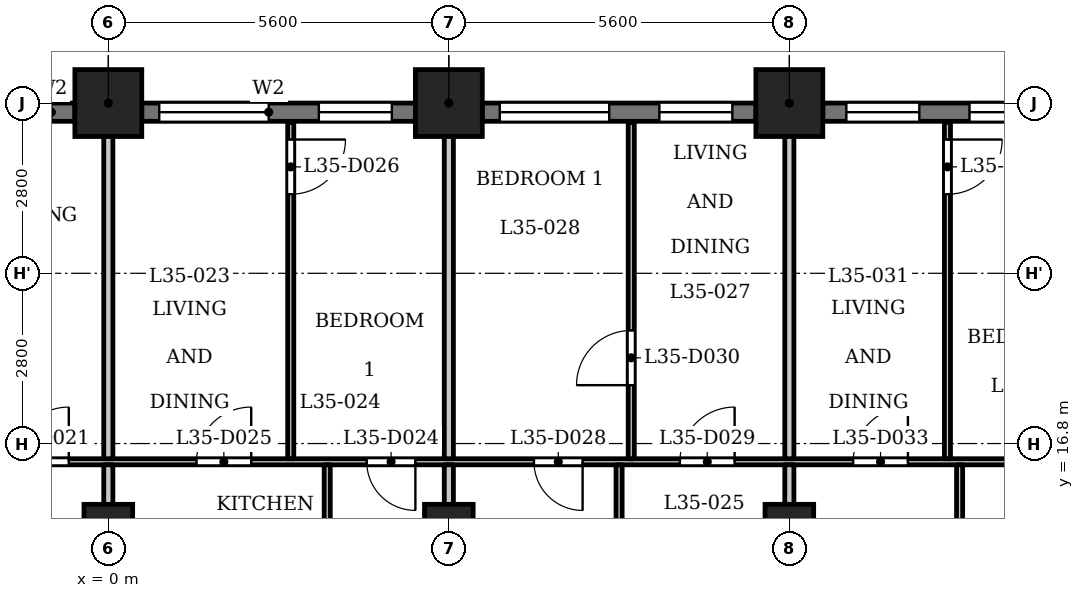
"""IFC4 building model, lengths in metres.
Left out: names, types, materials, properties, quantities, classifications, styles, units other than length and angle.
Written with IfcOpenShell. Run it as: python <this file> out.ifc"""

import sys

from ifc_helpers import new_model, si_unit, direction, frame, frame_2d, origin, origin_2d, place, context, subcontext, project, spatial, rectangle, extrude, element, fill, save


model = new_model("IFC4")
c1 = context("Model", 3, precision=1e-05, world=origin(), true_north=direction((0.0, 1.0)))
c2 = subcontext(c1, "Body", "Model", "MODEL_VIEW")
j1 = project(units=[si_unit("LENGTHUNIT", "METRE"), si_unit("PLANEANGLEUNIT", "RADIAN")], contexts=[c1])
p1 = place(None, origin())
s1 = spatial("IfcSite", under=j1, at=p1, CompositionType="ELEMENT")
p2 = place(p1, origin())
s2 = spatial("IfcBuilding", under=s1, at=p2, CompositionType="ELEMENT")
p3 = place(p2, frame((0.0, 0.0, 139.6)))
s3 = spatial("IfcBuildingStorey", under=s2, at=p3, CompositionType="ELEMENT", Elevation=139.6)
for number, where, z_axis, x_axis in (
    (1, (11.2, 22.4, 0.0), (0.0, 0.0, 1.0), (1.0, 0.0, 0.0)),
    (2, (5.6, 22.4, 0.0), (0.0, 0.0, 1.0), (1.0, 0.0, 0.0)),
    (3, (0.0, 22.4, 0.0), (0.0, 0.0, 1.0), (1.0, 0.0, 0.0)),
):
    element("IfcColumn", number, at=place(p3, frame(where, z_axis=z_axis, x_axis=x_axis)), inside=s3, PredefinedType="COLUMN", context=c2, shape_type="SweptSolid", body=[
        extrude(rectangle(XDim=1.1, YDim=1.1, at=origin_2d()), origin(), (0.0, 0.0, 1.0), 3.5),
    ])
for number, where, z_axis, x_axis in (
    (4, (0.0, 15.4, 0.0), (0.0, 0.0, 1.0), (1.0, 0.0, 0.0)),
    (5, (5.6, 15.4, 0.0), (0.0, 0.0, 1.0), (1.0, 0.0, 0.0)),
    (6, (11.2, 15.4, 0.0), (0.0, 0.0, 1.0), (1.0, 0.0, 0.0)),
):
    element("IfcColumn", number, at=place(p3, frame(where, z_axis=z_axis, x_axis=x_axis)), inside=s3, PredefinedType="COLUMN", context=c2, shape_type="SweptSolid", body=[
        extrude(rectangle(XDim=0.8, YDim=0.8, at=origin_2d()), origin(), (0.0, 0.0, 1.0), 3.5),
    ])
p4 = place(p3, frame((16.25, 22.25, 0.0), z_axis=(0.0, 0.0, 1.0), x_axis=(-1.0, 0.0, 0.0)))
e7 = element("IfcWall", 7, at=p4, inside=s3, PredefinedType="SOLIDWALL", context=c2, shape_type="SweptSolid", body=[
    extrude(rectangle(XDim=4.5, YDim=0.3, at=frame_2d((2.25, 0.0))), origin(), (0.0, 0.0, 1.0), 2.45),
])
p5 = place(p4, frame((0.288, 0.0, 0.9)))
e8 = element("IfcOpeningElement", 8, at=p5, cuts=e7, PredefinedType="OPENING", context=c2, shape_type="SweptSolid", body=[
    extrude(rectangle(XDim=1.8, YDim=1.25, at=frame_2d((0.9, 0.625))), frame((0.0, 0.16, 0.0), z_axis=(0.0, -1.0, 0.0), x_axis=(1.0, 0.0, 0.0)), (0.0, 0.0, 1.0), 0.32),
])
p6 = place(p4, frame((2.913, 0.0, 0.6)))
e9 = element("IfcOpeningElement", 9, at=p6, cuts=e7, PredefinedType="OPENING", context=c2, shape_type="SweptSolid", body=[
    extrude(rectangle(XDim=1.2, YDim=1.55, at=frame_2d((0.6, 0.775))), frame((0.0, 0.16, 0.0), z_axis=(0.0, -1.0, 0.0), x_axis=(1.0, 0.0, 0.0)), (0.0, 0.0, 1.0), 0.32),
])
p7 = place(p3, frame((10.65, 22.25, 0.0), z_axis=(0.0, 0.0, 1.0), x_axis=(-1.0, 0.0, 0.0)))
e10 = element("IfcWall", 10, at=p7, inside=s3, PredefinedType="SOLIDWALL", context=c2, shape_type="SweptSolid", body=[
    extrude(rectangle(XDim=4.5, YDim=0.3, at=frame_2d((2.25, 0.0))), origin(), (0.0, 0.0, 1.0), 2.45),
])
p8 = place(p7, frame((0.387, 0.0, 0.6)))
e11 = element("IfcOpeningElement", 11, at=p8, cuts=e10, PredefinedType="OPENING", context=c2, shape_type="SweptSolid", body=[
    extrude(rectangle(XDim=1.2, YDim=1.55, at=frame_2d((0.6, 0.775))), frame((0.0, 0.16, 0.0), z_axis=(0.0, -1.0, 0.0), x_axis=(1.0, 0.0, 0.0)), (0.0, 0.0, 1.0), 0.32),
])
p9 = place(p7, frame((2.413, 0.0, 0.9)))
e12 = element("IfcOpeningElement", 12, at=p9, cuts=e10, PredefinedType="OPENING", context=c2, shape_type="SweptSolid", body=[
    extrude(rectangle(XDim=1.8, YDim=1.25, at=frame_2d((0.9, 0.625))), frame((0.0, 0.16, 0.0), z_axis=(0.0, -1.0, 0.0), x_axis=(1.0, 0.0, 0.0)), (0.0, 0.0, 1.0), 0.32),
])
p10 = place(p3, frame((5.05, 22.25, 0.0), z_axis=(0.0, 0.0, 1.0), x_axis=(-1.0, 0.0, 0.0)))
e13 = element("IfcWall", 13, at=p10, inside=s3, PredefinedType="SOLIDWALL", context=c2, shape_type="SweptSolid", body=[
    extrude(rectangle(XDim=4.5, YDim=0.3, at=frame_2d((2.25, 0.0))), origin(), (0.0, 0.0, 1.0), 2.45),
])
p11 = place(p10, frame((0.387, 0.0, 0.6)))
e14 = element("IfcOpeningElement", 14, at=p11, cuts=e13, PredefinedType="OPENING", context=c2, shape_type="SweptSolid", body=[
    extrude(rectangle(XDim=1.2, YDim=1.55, at=frame_2d((0.6, 0.775))), frame((0.0, 0.16, 0.0), z_axis=(0.0, -1.0, 0.0), x_axis=(1.0, 0.0, 0.0)), (0.0, 0.0, 1.0), 0.32),
])
p12 = place(p10, frame((2.413, 0.0, 0.9)))
e15 = element("IfcOpeningElement", 15, at=p12, cuts=e13, PredefinedType="OPENING", context=c2, shape_type="SweptSolid", body=[
    extrude(rectangle(XDim=1.8, YDim=1.25, at=frame_2d((0.9, 0.625))), frame((0.0, 0.16, 0.0), z_axis=(0.0, -1.0, 0.0), x_axis=(1.0, 0.0, 0.0)), (0.0, 0.0, 1.0), 0.32),
])
p13 = place(p3, frame((-0.55, 22.25, 0.0), z_axis=(0.0, 0.0, 1.0), x_axis=(-1.0, 0.0, 0.0)))
e16 = element("IfcWall", 16, at=p13, inside=s3, PredefinedType="SOLIDWALL", context=c2, shape_type="SweptSolid", body=[
    extrude(rectangle(XDim=4.5, YDim=0.3, at=frame_2d((2.25, 0.0))), origin(), (0.0, 0.0, 1.0), 2.45),
])
p14 = place(p13, frame((0.387, 0.0, 0.9)))
e17 = element("IfcOpeningElement", 17, at=p14, cuts=e16, PredefinedType="OPENING", context=c2, shape_type="SweptSolid", body=[
    extrude(rectangle(XDim=1.8, YDim=1.25, at=frame_2d((0.9, 0.625))), frame((0.0, 0.16, 0.0), z_axis=(0.0, -1.0, 0.0), x_axis=(1.0, 0.0, 0.0)), (0.0, 0.0, 1.0), 0.32),
])
p15 = place(p13, frame((3.012, 0.0, 0.6)))
e18 = element("IfcOpeningElement", 18, at=p15, cuts=e16, PredefinedType="OPENING", context=c2, shape_type="SweptSolid", body=[
    extrude(rectangle(XDim=1.2, YDim=1.55, at=frame_2d((0.6, 0.775))), frame((0.0, 0.16, 0.0), z_axis=(0.0, -1.0, 0.0), x_axis=(1.0, 0.0, 0.0)), (0.0, 0.0, 1.0), 0.32),
])
p16 = place(p3, frame((-16.725, 16.5, 0.0), z_axis=(0.0, 0.0, 1.0), x_axis=(1.0, 0.0, 0.0)))
e19 = element("IfcWall", 19, at=p16, inside=s3, PredefinedType="PARTITIONING", context=c2, shape_type="SweptSolid", body=[
    extrude(rectangle(XDim=33.45, YDim=0.1, at=frame_2d((16.725, 0.0))), origin(), (0.0, 0.0, 1.0), 3.2),
])
p17 = place(p16, frame((9.675, 0.0, 0.0)))
e20 = element("IfcOpeningElement", 20, at=p17, cuts=e19, PredefinedType="OPENING", context=c2, shape_type="SweptSolid", body=[
    extrude(rectangle(XDim=0.8, YDim=2.1, at=frame_2d((0.4, 1.05))), frame((0.0, 0.06, 0.0), z_axis=(0.0, -1.0, 0.0), x_axis=(1.0, 0.0, 0.0)), (0.0, 0.0, 1.0), 0.12),
])
p18 = place(p16, frame((3.975, 0.0, 0.0)))
e21 = element("IfcOpeningElement", 21, at=p18, cuts=e19, PredefinedType="OPENING", context=c2, shape_type="SweptSolid", body=[
    extrude(rectangle(XDim=0.9, YDim=2.1, at=frame_2d((0.45, 1.05))), frame((0.0, 0.06, 0.0), z_axis=(0.0, -1.0, 0.0), x_axis=(1.0, 0.0, 0.0)), (0.0, 0.0, 1.0), 0.12),
])
p19 = place(p16, frame((12.025, 0.0, 0.0)))
e22 = element("IfcOpeningElement", 22, at=p19, cuts=e19, PredefinedType="OPENING", context=c2, shape_type="SweptSolid", body=[
    extrude(rectangle(XDim=0.8, YDim=2.1, at=frame_2d((0.4, 1.05))), frame((0.0, 0.06, 0.0), z_axis=(0.0, -1.0, 0.0), x_axis=(1.0, 0.0, 0.0)), (0.0, 0.0, 1.0), 0.12),
])
p20 = place(p16, frame((15.175, 0.0, 0.0)))
e23 = element("IfcOpeningElement", 23, at=p20, cuts=e19, PredefinedType="OPENING", context=c2, shape_type="SweptSolid", body=[
    extrude(rectangle(XDim=0.9, YDim=2.1, at=frame_2d((0.45, 1.05))), frame((0.0, 0.06, 0.0), z_axis=(0.0, -1.0, 0.0), x_axis=(1.0, 0.0, 0.0)), (0.0, 0.0, 1.0), 0.12),
])
p21 = place(p16, frame((20.975, 0.0, 0.0)))
e24 = element("IfcOpeningElement", 24, at=p21, cuts=e19, PredefinedType="OPENING", context=c2, shape_type="SweptSolid", body=[
    extrude(rectangle(XDim=0.8, YDim=2.1, at=frame_2d((0.4, 1.05))), frame((0.0, 0.06, 0.0), z_axis=(0.0, -1.0, 0.0), x_axis=(1.0, 0.0, 0.0)), (0.0, 0.0, 1.0), 0.12),
])
p22 = place(p16, frame((18.175, 0.0, 0.0)))
e25 = element("IfcOpeningElement", 25, at=p22, cuts=e19, PredefinedType="OPENING", context=c2, shape_type="SweptSolid", body=[
    extrude(rectangle(XDim=0.9, YDim=2.1, at=frame_2d((0.45, 1.05))), frame((0.0, 0.06, 0.0), z_axis=(0.0, -1.0, 0.0), x_axis=(1.0, 0.0, 0.0)), (0.0, 0.0, 1.0), 0.12),
])
p23 = place(p16, frame((23.725, 0.0, 0.0)))
e26 = element("IfcOpeningElement", 26, at=p23, cuts=e19, PredefinedType="OPENING", context=c2, shape_type="SweptSolid", body=[
    extrude(rectangle(XDim=0.8, YDim=2.1, at=frame_2d((0.4, 1.05))), frame((0.0, 0.06, 0.0), z_axis=(0.0, -1.0, 0.0), x_axis=(1.0, 0.0, 0.0)), (0.0, 0.0, 1.0), 0.12),
])
p24 = place(p16, frame((26.125, 0.0, 0.0)))
e27 = element("IfcOpeningElement", 27, at=p24, cuts=e19, PredefinedType="OPENING", context=c2, shape_type="SweptSolid", body=[
    extrude(rectangle(XDim=0.9, YDim=2.1, at=frame_2d((0.45, 1.05))), frame((0.0, 0.06, 0.0), z_axis=(0.0, -1.0, 0.0), x_axis=(1.0, 0.0, 0.0)), (0.0, 0.0, 1.0), 0.12),
])
p25 = place(p16, frame((32.125, 0.0, 0.0)))
e28 = element("IfcOpeningElement", 28, at=p25, cuts=e19, PredefinedType="OPENING", context=c2, shape_type="SweptSolid", body=[
    extrude(rectangle(XDim=0.8, YDim=2.1, at=frame_2d((0.4, 1.05))), frame((0.0, 0.06, 0.0), z_axis=(0.0, -1.0, 0.0), x_axis=(1.0, 0.0, 0.0)), (0.0, 0.0, 1.0), 0.12),
])
p26 = place(p16, frame((28.975, 0.0, 0.0)))
e29 = element("IfcOpeningElement", 29, at=p26, cuts=e19, PredefinedType="OPENING", context=c2, shape_type="SweptSolid", body=[
    extrude(rectangle(XDim=0.9, YDim=2.1, at=frame_2d((0.45, 1.05))), frame((0.0, 0.06, 0.0), z_axis=(0.0, -1.0, 0.0), x_axis=(1.0, 0.0, 0.0)), (0.0, 0.0, 1.0), 0.12),
])
p27 = place(p3, frame((0.0, 13.275, 0.0), z_axis=(0.0, 0.0, 1.0), x_axis=(0.0, 1.0, 0.0)))
e30 = element("IfcWall", 30, at=p27, inside=s3, PredefinedType="PARTITIONING", context=c2, shape_type="SweptSolid", body=[
    extrude(rectangle(XDim=3.175, YDim=0.15, at=frame_2d((1.587, 0.0))), origin(), (0.0, 0.0, 1.0), 3.2),
])
p28 = place(p3, frame((0.0, 16.55, 0.0), z_axis=(0.0, 0.0, 1.0), x_axis=(0.0, 1.0, 0.0)))
e31 = element("IfcWall", 31, at=p28, inside=s3, PredefinedType="PARTITIONING", context=c2, shape_type="SweptSolid", body=[
    extrude(rectangle(XDim=6.38, YDim=0.15, at=frame_2d((3.19, 0.0))), origin(), (0.0, 0.0, 1.0), 3.2),
])
p29 = place(p3, frame((3.0, 16.55, 0.0), z_axis=(0.0, 0.0, 1.0), x_axis=(0.0, 1.0, 0.0)))
e32 = element("IfcWall", 32, at=p29, inside=s3, PredefinedType="PARTITIONING", context=c2, shape_type="SweptSolid", body=[
    extrude(rectangle(XDim=5.53, YDim=0.1, at=frame_2d((2.765, 0.0))), origin(), (0.0, 0.0, 1.0), 3.2),
])
p30 = place(p29, frame((4.35, 0.0, 0.0)))
e33 = element("IfcOpeningElement", 33, at=p30, cuts=e32, PredefinedType="OPENING", context=c2, shape_type="SweptSolid", body=[
    extrude(rectangle(XDim=0.9, YDim=2.1, at=frame_2d((0.45, 1.05))), frame((0.0, 0.06, 0.0), z_axis=(0.0, -1.0, 0.0), x_axis=(1.0, 0.0, 0.0)), (0.0, 0.0, 1.0), 0.12),
])
p31 = place(p3, frame((3.6, 13.275, 0.0), z_axis=(0.0, 0.0, 1.0), x_axis=(0.0, 1.0, 0.0)))
e34 = element("IfcWall", 34, at=p31, inside=s3, PredefinedType="PARTITIONING", context=c2, shape_type="SweptSolid", body=[
    extrude(rectangle(XDim=3.175, YDim=0.1, at=frame_2d((1.587, 0.0))), origin(), (0.0, 0.0, 1.0), 3.2),
])
p32 = place(p3, frame((5.6, 13.275, 0.0), z_axis=(0.0, 0.0, 1.0), x_axis=(0.0, 1.0, 0.0)))
e35 = element("IfcWall", 35, at=p32, inside=s3, PredefinedType="PARTITIONING", context=c2, shape_type="SweptSolid", body=[
    extrude(rectangle(XDim=3.175, YDim=0.15, at=frame_2d((1.587, 0.0))), origin(), (0.0, 0.0, 1.0), 3.2),
])
p33 = place(p3, frame((5.6, 16.55, 0.0), z_axis=(0.0, 0.0, 1.0), x_axis=(0.0, 1.0, 0.0)))
e36 = element("IfcWall", 36, at=p33, inside=s3, PredefinedType="PARTITIONING", context=c2, shape_type="SweptSolid", body=[
    extrude(rectangle(XDim=6.38, YDim=0.15, at=frame_2d((3.19, 0.0))), origin(), (0.0, 0.0, 1.0), 3.2),
])
p34 = place(p3, frame((8.4, 13.275, 0.0), z_axis=(0.0, 0.0, 1.0), x_axis=(0.0, 1.0, 0.0)))
e37 = element("IfcWall", 37, at=p34, inside=s3, PredefinedType="PARTITIONING", context=c2, shape_type="SweptSolid", body=[
    extrude(rectangle(XDim=3.175, YDim=0.1, at=frame_2d((1.587, 0.0))), origin(), (0.0, 0.0, 1.0), 3.2),
])
p35 = place(p3, frame((8.6, 16.55, 0.0), z_axis=(0.0, 0.0, 1.0), x_axis=(0.0, 1.0, 0.0)))
e38 = element("IfcWall", 38, at=p35, inside=s3, PredefinedType="PARTITIONING", context=c2, shape_type="SweptSolid", body=[
    extrude(rectangle(XDim=5.53, YDim=0.1, at=frame_2d((2.765, 0.0))), origin(), (0.0, 0.0, 1.0), 3.2),
])
p36 = place(p35, frame((1.21, 0.0, 0.0)))
e39 = element("IfcOpeningElement", 39, at=p36, cuts=e38, PredefinedType="OPENING", context=c2, shape_type="SweptSolid", body=[
    extrude(rectangle(XDim=0.9, YDim=2.1, at=frame_2d((0.45, 1.05))), frame((0.0, 0.06, 0.0), z_axis=(0.0, -1.0, 0.0), x_axis=(1.0, 0.0, 0.0)), (0.0, 0.0, 1.0), 0.12),
])
p37 = place(p3, frame((11.2, 13.275, 0.0), z_axis=(0.0, 0.0, 1.0), x_axis=(0.0, 1.0, 0.0)))
e40 = element("IfcWall", 40, at=p37, inside=s3, PredefinedType="PARTITIONING", context=c2, shape_type="SweptSolid", body=[
    extrude(rectangle(XDim=3.175, YDim=0.15, at=frame_2d((1.587, 0.0))), origin(), (0.0, 0.0, 1.0), 3.2),
])
p38 = place(p3, frame((11.2, 16.55, 0.0), z_axis=(0.0, 0.0, 1.0), x_axis=(0.0, 1.0, 0.0)))
e41 = element("IfcWall", 41, at=p38, inside=s3, PredefinedType="PARTITIONING", context=c2, shape_type="SweptSolid", body=[
    extrude(rectangle(XDim=6.38, YDim=0.15, at=frame_2d((3.19, 0.0))), origin(), (0.0, 0.0, 1.0), 3.2),
])
p39 = place(p3, frame((13.8, 16.55, 0.0), z_axis=(0.0, 0.0, 1.0), x_axis=(0.0, 1.0, 0.0)))
e42 = element("IfcWall", 42, at=p39, inside=s3, PredefinedType="PARTITIONING", context=c2, shape_type="SweptSolid", body=[
    extrude(rectangle(XDim=5.53, YDim=0.1, at=frame_2d((2.765, 0.0))), origin(), (0.0, 0.0, 1.0), 3.2),
])
p40 = place(p39, frame((4.35, 0.0, 0.0)))
e43 = element("IfcOpeningElement", 43, at=p40, cuts=e42, PredefinedType="OPENING", context=c2, shape_type="SweptSolid", body=[
    extrude(rectangle(XDim=0.9, YDim=2.1, at=frame_2d((0.45, 1.05))), frame((0.0, 0.06, 0.0), z_axis=(0.0, -1.0, 0.0), x_axis=(1.0, 0.0, 0.0)), (0.0, 0.0, 1.0), 0.12),
])
p41 = place(p3, frame((14.0, 13.275, 0.0), z_axis=(0.0, 0.0, 1.0), x_axis=(0.0, 1.0, 0.0)))
e44 = element("IfcWall", 44, at=p41, inside=s3, PredefinedType="PARTITIONING", context=c2, shape_type="SweptSolid", body=[
    extrude(rectangle(XDim=3.175, YDim=0.1, at=frame_2d((1.587, 0.0))), origin(), (0.0, 0.0, 1.0), 3.2),
])
p42 = place(p20, origin())
e45 = element("IfcDoor", 45, at=p42, inside=s3, OperationType="SINGLE_SWING_LEFT", PredefinedType="DOOR", context=c2, shape_type="SweptSolid", body=[
    extrude(rectangle(XDim=0.9, YDim=2.1, at=frame_2d((0.45, 1.05))), frame((0.0, 0.025, 0.0), z_axis=(0.0, -1.0, 0.0), x_axis=(1.0, 0.0, 0.0)), (0.0, 0.0, 1.0), 0.05),
])
fill(e23, e45)
p43 = place(p21, origin())
e46 = element("IfcDoor", 46, at=p43, inside=s3, OperationType="SINGLE_SWING_RIGHT", PredefinedType="DOOR", context=c2, shape_type="SweptSolid", body=[
    extrude(rectangle(XDim=0.8, YDim=2.1, at=frame_2d((0.4, 1.05))), frame((0.0, 0.025, 0.0), z_axis=(0.0, -1.0, 0.0), x_axis=(1.0, 0.0, 0.0)), (0.0, 0.0, 1.0), 0.05),
])
fill(e24, e46)
p44 = place(p22, origin())
e47 = element("IfcDoor", 47, at=p44, inside=s3, OperationType="SINGLE_SWING_LEFT", PredefinedType="DOOR", context=c2, shape_type="SweptSolid", body=[
    extrude(rectangle(XDim=0.9, YDim=2.1, at=frame_2d((0.45, 1.05))), frame((0.0, 0.025, 0.0), z_axis=(0.0, -1.0, 0.0), x_axis=(1.0, 0.0, 0.0)), (0.0, 0.0, 1.0), 0.05),
])
fill(e25, e47)
p45 = place(p30, origin())
e48 = element("IfcDoor", 48, at=p45, inside=s3, OperationType="SINGLE_SWING_RIGHT", PredefinedType="DOOR", context=c2, shape_type="SweptSolid", body=[
    extrude(rectangle(XDim=0.9, YDim=2.1, at=frame_2d((0.45, 1.05))), frame((0.0, 0.025, 0.0), z_axis=(0.0, -1.0, 0.0), x_axis=(1.0, 0.0, 0.0)), (0.0, 0.0, 1.0), 0.05),
])
fill(e33, e48)
p46 = place(p23, origin())
e49 = element("IfcDoor", 49, at=p46, inside=s3, OperationType="SINGLE_SWING_RIGHT", PredefinedType="DOOR", context=c2, shape_type="SweptSolid", body=[
    extrude(rectangle(XDim=0.8, YDim=2.1, at=frame_2d((0.4, 1.05))), frame((0.0, 0.025, 0.0), z_axis=(0.0, -1.0, 0.0), x_axis=(1.0, 0.0, 0.0)), (0.0, 0.0, 1.0), 0.05),
])
fill(e26, e49)
p47 = place(p24, origin())
e50 = element("IfcDoor", 50, at=p47, inside=s3, OperationType="SINGLE_SWING_LEFT", PredefinedType="DOOR", context=c2, shape_type="SweptSolid", body=[
    extrude(rectangle(XDim=0.9, YDim=2.1, at=frame_2d((0.45, 1.05))), frame((0.0, 0.025, 0.0), z_axis=(0.0, -1.0, 0.0), x_axis=(1.0, 0.0, 0.0)), (0.0, 0.0, 1.0), 0.05),
])
fill(e27, e50)
p48 = place(p36, origin())
e51 = element("IfcDoor", 51, at=p48, inside=s3, OperationType="SINGLE_SWING_RIGHT", PredefinedType="DOOR", context=c2, shape_type="SweptSolid", body=[
    extrude(rectangle(XDim=0.9, YDim=2.1, at=frame_2d((0.45, 1.05))), frame((0.0, 0.025, 0.0), z_axis=(0.0, -1.0, 0.0), x_axis=(1.0, 0.0, 0.0)), (0.0, 0.0, 1.0), 0.05),
])
fill(e39, e51)
p49 = place(p26, origin())
e52 = element("IfcDoor", 52, at=p49, inside=s3, OperationType="SINGLE_SWING_LEFT", PredefinedType="DOOR", context=c2, shape_type="SweptSolid", body=[
    extrude(rectangle(XDim=0.9, YDim=2.1, at=frame_2d((0.45, 1.05))), frame((0.0, 0.025, 0.0), z_axis=(0.0, -1.0, 0.0), x_axis=(1.0, 0.0, 0.0)), (0.0, 0.0, 1.0), 0.05),
])
fill(e29, e52)
p50 = place(p40, origin())
e53 = element("IfcDoor", 53, at=p50, inside=s3, OperationType="SINGLE_SWING_RIGHT", PredefinedType="DOOR", context=c2, shape_type="SweptSolid", body=[
    extrude(rectangle(XDim=0.9, YDim=2.1, at=frame_2d((0.45, 1.05))), frame((0.0, 0.025, 0.0), z_axis=(0.0, -1.0, 0.0), x_axis=(1.0, 0.0, 0.0)), (0.0, 0.0, 1.0), 0.05),
])
fill(e43, e53)
p51 = place(p5, origin())
e54 = element("IfcWindow", 54, at=p51, inside=s3, PartitioningType="SINGLE_PANEL", PredefinedType="WINDOW", context=c2, shape_type="SweptSolid", body=[
    extrude(rectangle(XDim=1.8, YDim=1.25, at=frame_2d((0.9, 0.625))), frame((0.0, 0.03, 0.0), z_axis=(0.0, -1.0, 0.0), x_axis=(1.0, 0.0, 0.0)), (0.0, 0.0, 1.0), 0.06),
])
fill(e8, e54)
p52 = place(p6, origin())
e55 = element("IfcWindow", 55, at=p52, inside=s3, PartitioningType="SINGLE_PANEL", PredefinedType="WINDOW", context=c2, shape_type="SweptSolid", body=[
    extrude(rectangle(XDim=1.2, YDim=1.55, at=frame_2d((0.6, 0.775))), frame((0.0, 0.03, 0.0), z_axis=(0.0, -1.0, 0.0), x_axis=(1.0, 0.0, 0.0)), (0.0, 0.0, 1.0), 0.06),
])
fill(e9, e55)
p53 = place(p8, origin())
e56 = element("IfcWindow", 56, at=p53, inside=s3, PartitioningType="SINGLE_PANEL", PredefinedType="WINDOW", context=c2, shape_type="SweptSolid", body=[
    extrude(rectangle(XDim=1.2, YDim=1.55, at=frame_2d((0.6, 0.775))), frame((0.0, 0.03, 0.0), z_axis=(0.0, -1.0, 0.0), x_axis=(1.0, 0.0, 0.0)), (0.0, 0.0, 1.0), 0.06),
])
fill(e11, e56)
p54 = place(p9, origin())
e57 = element("IfcWindow", 57, at=p54, inside=s3, PartitioningType="SINGLE_PANEL", PredefinedType="WINDOW", context=c2, shape_type="SweptSolid", body=[
    extrude(rectangle(XDim=1.8, YDim=1.25, at=frame_2d((0.9, 0.625))), frame((0.0, 0.03, 0.0), z_axis=(0.0, -1.0, 0.0), x_axis=(1.0, 0.0, 0.0)), (0.0, 0.0, 1.0), 0.06),
])
fill(e12, e57)
p55 = place(p11, origin())
e58 = element("IfcWindow", 58, at=p55, inside=s3, PartitioningType="SINGLE_PANEL", PredefinedType="WINDOW", context=c2, shape_type="SweptSolid", body=[
    extrude(rectangle(XDim=1.2, YDim=1.55, at=frame_2d((0.6, 0.775))), frame((0.0, 0.03, 0.0), z_axis=(0.0, -1.0, 0.0), x_axis=(1.0, 0.0, 0.0)), (0.0, 0.0, 1.0), 0.06),
])
fill(e14, e58)
p56 = place(p12, origin())
e59 = element("IfcWindow", 59, at=p56, inside=s3, PartitioningType="SINGLE_PANEL", PredefinedType="WINDOW", context=c2, shape_type="SweptSolid", body=[
    extrude(rectangle(XDim=1.8, YDim=1.25, at=frame_2d((0.9, 0.625))), frame((0.0, 0.03, 0.0), z_axis=(0.0, -1.0, 0.0), x_axis=(1.0, 0.0, 0.0)), (0.0, 0.0, 1.0), 0.06),
])
fill(e15, e59)
save(model, sys.argv[1])
